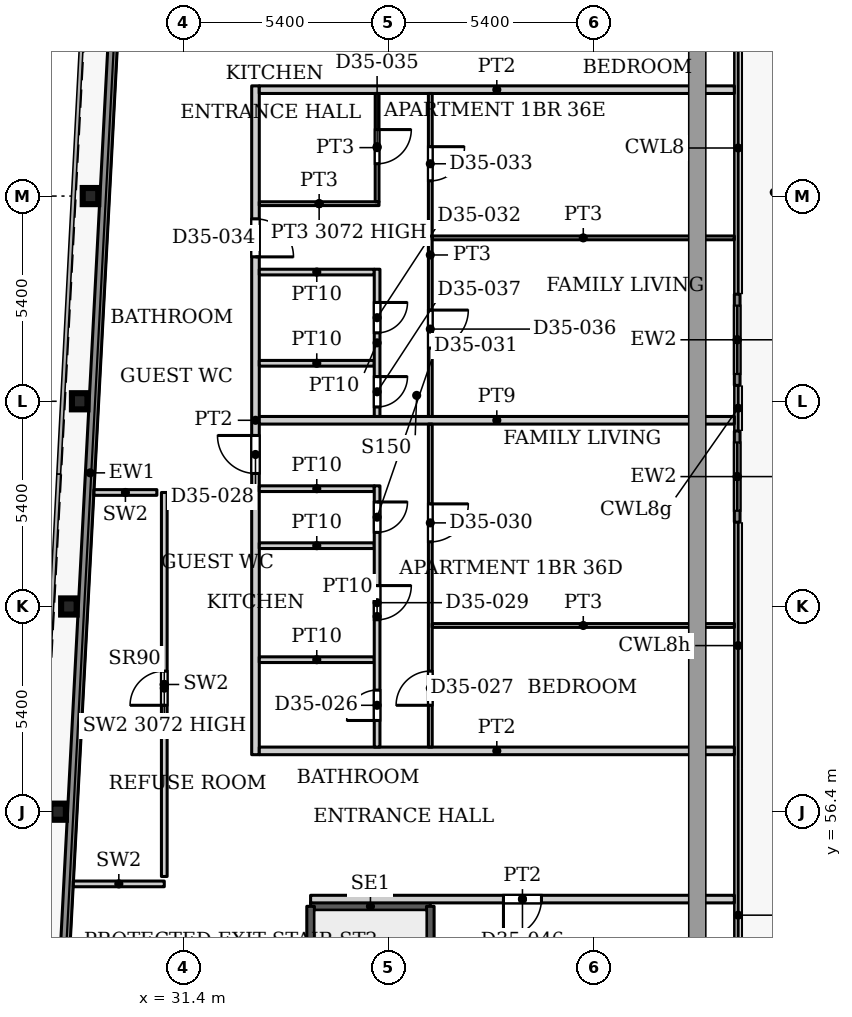
"""IFC4 building model, lengths in metres.
Left out: names, types, materials, properties, quantities, classifications, styles, units other than length and angle.
Written with IfcOpenShell. Run it as: python <this file> out.ifc"""

import sys

from ifc_helpers import new_model, si_unit, direction, frame, frame_2d, origin, origin_2d, place, context, subcontext, project, spatial, rectangle, i_section, extrude, source, transform, mapped, element, fill, save


model = new_model("IFC4")
c1 = context("Model", 3, precision=1e-05, world=origin(), true_north=direction((0.0, 1.0)))
c2 = subcontext(c1, "Body", "Model", "MODEL_VIEW")
j1 = project(units=[si_unit("LENGTHUNIT", "METRE"), si_unit("PLANEANGLEUNIT", "RADIAN")], contexts=[c1])
p1 = place(None, origin())
s1 = spatial("IfcSite", under=j1, at=p1, CompositionType="ELEMENT")
p2 = place(p1, origin())
s2 = spatial("IfcBuilding", under=s1, at=p2, CompositionType="ELEMENT")
p3 = place(p2, frame((0.0, 0.0, 156.5)))
s3 = spatial("IfcBuildingStorey", under=s2, at=p3, CompositionType="ELEMENT", Elevation=156.5)
for number, where, z_axis, x_axis in (
    (1, (28.106, 56.4, 0.0), (0.0, 0.0, 1.0), (1.0, 0.0, 0.0)),
    (2, (28.39, 61.8, 0.0), (0.0, 0.0, 1.0), (1.0, 0.0, 0.0)),
    (3, (28.674, 67.2, 0.0), (0.0, 0.0, 1.0), (1.0, 0.0, 0.0)),
    (4, (28.958, 72.6, 0.0), (0.0, 0.0, 1.0), (1.0, 0.0, 0.0)),
):
    element("IfcColumn", number, at=place(p3, frame(where, z_axis=z_axis, x_axis=x_axis)), inside=s3, PredefinedType="COLUMN", context=c2, shape_type="SweptSolid", body=[
        extrude(i_section(OverallWidth=0.409, OverallDepth=0.425, WebThickness=0.033, FlangeThickness=0.052, FilletRadius=0.013, at=origin_2d()), origin(), (0.0, 0.0, 1.0), 3.9),
    ])
p4 = place(p3, frame((27.195, 31.969, 0.0), z_axis=(0.0, 0.0, 1.0), x_axis=(0.052554995867, 0.998618031286, 0.0)))
e5 = element("IfcWall", 5, at=p4, inside=s3, PredefinedType="SOLIDWALL", context=c2, shape_type="SweptSolid", body=[
    extrude(rectangle(XDim=66.787, YDim=0.25, at=frame_2d((33.394, 0.0))), origin(), (0.0, 0.0, 1.0), 3.75),
])
p5 = place(p3, frame((45.975, 70.018, 0.0), z_axis=(0.0, 0.0, 1.0), x_axis=(0.0, -1.0, 0.0)))
e6 = element("IfcWall", 6, at=p5, inside=s3, PredefinedType="SOLIDWALL", context=c2, shape_type="SweptSolid", body=[
    extrude(rectangle(XDim=2.4, YDim=0.15, at=frame_2d((1.2, 0.0))), origin(), (0.0, 0.0, 1.0), 3.75),
])
p6 = place(p5, frame((0.3, 0.0, 0.0)))
e7 = element("IfcOpeningElement", 7, at=p6, cuts=e6, PredefinedType="OPENING", context=c2, shape_type="SweptSolid", body=[
    extrude(rectangle(XDim=1.8, YDim=2.4, at=frame_2d((0.9, 1.2))), frame((0.0, 0.085, 0.0), z_axis=(0.0, -1.0, 0.0), x_axis=(1.0, 0.0, 0.0)), (0.0, 0.0, 1.0), 0.17),
])
p7 = place(p3, frame((45.975, 66.418, 0.0), z_axis=(0.0, 0.0, 1.0), x_axis=(0.0, -1.0, 0.0)))
e8 = element("IfcWall", 8, at=p7, inside=s3, PredefinedType="SOLIDWALL", context=c2, shape_type="SweptSolid", body=[
    extrude(rectangle(XDim=2.4, YDim=0.15, at=frame_2d((1.2, 0.0))), origin(), (0.0, 0.0, 1.0), 3.75),
])
p8 = place(p7, frame((0.3, 0.0, 0.0)))
e9 = element("IfcOpeningElement", 9, at=p8, cuts=e8, PredefinedType="OPENING", context=c2, shape_type="SweptSolid", body=[
    extrude(rectangle(XDim=1.8, YDim=2.4, at=frame_2d((0.9, 1.2))), frame((0.0, 0.085, 0.0), z_axis=(0.0, -1.0, 0.0), x_axis=(1.0, 0.0, 0.0)), (0.0, 0.0, 1.0), 0.17),
])
p9 = place(p3, frame((34.75, 53.91, 0.0), z_axis=(0.0, 0.0, 1.0), x_axis=(1.0, 0.0, 0.0)))
e10 = element("IfcWall", 10, at=p9, inside=s3, PredefinedType="SHEAR", context=c2, shape_type="SweptSolid", body=[
    extrude(rectangle(XDim=3.15, YDim=0.2, at=frame_2d((1.575, 0.0))), origin(), (0.0, 0.0, 1.0), 3.9),
])
p10 = place(p3, frame((34.75, 47.5, 0.0), z_axis=(0.0, 0.0, 1.0), x_axis=(0.0, 1.0, 0.0)))
e11 = element("IfcWall", 11, at=p10, inside=s3, PredefinedType="SHEAR", context=c2, shape_type="SweptSolid", body=[
    extrude(rectangle(XDim=6.41, YDim=0.2, at=frame_2d((3.205, 0.0))), origin(), (0.0, 0.0, 1.0), 3.9),
])
p11 = place(p3, frame((37.9, 44.75, 0.0), z_axis=(0.0, 0.0, 1.0), x_axis=(0.0, 1.0, 0.0)))
e12 = element("IfcWall", 12, at=p11, inside=s3, PredefinedType="SHEAR", context=c2, shape_type="SweptSolid", body=[
    extrude(rectangle(XDim=9.16, YDim=0.2, at=frame_2d((4.58, 0.0))), origin(), (0.0, 0.0, 1.0), 3.9),
])
p12 = place(p3, frame((28.508, 54.5, 0.0), z_axis=(0.0, 0.0, 1.0), x_axis=(1.0, 0.0, 0.0)))
e13 = element("IfcWall", 13, at=p12, inside=s3, PredefinedType="PARTITIONING", context=c2, shape_type="SweptSolid", body=[
    extrude(rectangle(XDim=2.392, YDim=0.15, at=frame_2d((1.196, 0.0))), origin(), (0.0, 0.0, 1.0), 3.9),
])
p13 = place(p3, frame((30.9, 54.695, 0.0), z_axis=(0.0, 0.0, 1.0), x_axis=(0.0, 1.0, 0.0)))
e14 = element("IfcWall", 14, at=p13, inside=s3, PredefinedType="PARTITIONING", context=c2, shape_type="SweptSolid", body=[
    extrude(rectangle(XDim=10.105, YDim=0.15, at=frame_2d((5.052, 0.0))), origin(), (0.0, 0.0, 1.0), 3.072),
])
p14 = place(p13, frame((4.505, 0.0, 0.0)))
e15 = element("IfcOpeningElement", 15, at=p14, cuts=e14, PredefinedType="OPENING", context=c2, shape_type="SweptSolid", body=[
    extrude(rectangle(XDim=0.9, YDim=2.2, at=frame_2d((0.45, 1.1))), frame((0.0, 0.085, 0.0), z_axis=(0.0, -1.0, 0.0), x_axis=(1.0, 0.0, 0.0)), (0.0, 0.0, 1.0), 0.17),
])
p15 = place(p3, frame((29.05, 64.8, 0.0), z_axis=(0.0, 0.0, 1.0), x_axis=(1.0, 0.0, 0.0)))
e16 = element("IfcWall", 16, at=p15, inside=s3, PredefinedType="PARTITIONING", context=c2, shape_type="SweptSolid", body=[
    extrude(rectangle(XDim=1.655, YDim=0.15, at=frame_2d((0.828, 0.0))), origin(), (0.0, 0.0, 1.0), 3.9),
])
p16 = place(p3, frame((33.3, 57.9, 0.0), z_axis=(0.0, 0.0, 1.0), x_axis=(0.0, 1.0, 0.0)))
e17 = element("IfcWall", 17, at=p16, inside=s3, PredefinedType="PARTITIONING", context=c2, shape_type="SweptSolid", body=[
    extrude(rectangle(XDim=17.6, YDim=0.2, at=frame_2d((8.8, 0.0))), origin(), (0.0, 0.0, 1.0), 3.6),
])
p17 = place(p16, frame((7.4, 0.0, 0.0)))
e18 = element("IfcOpeningElement", 18, at=p17, cuts=e17, PredefinedType="OPENING", context=c2, shape_type="SweptSolid", body=[
    extrude(rectangle(XDim=1.0, YDim=2.1, at=frame_2d((0.5, 1.05))), frame((0.0, 0.11, 0.0), z_axis=(0.0, -1.0, 0.0), x_axis=(1.0, 0.0, 0.0)), (0.0, 0.0, 1.0), 0.22),
])
p18 = place(p16, frame((13.1, 0.0, 0.0)))
e19 = element("IfcOpeningElement", 19, at=p18, cuts=e17, PredefinedType="OPENING", context=c2, shape_type="SweptSolid", body=[
    extrude(rectangle(XDim=1.0, YDim=2.1, at=frame_2d((0.5, 1.05))), frame((0.0, 0.11, 0.0), z_axis=(0.0, -1.0, 0.0), x_axis=(1.0, 0.0, 0.0)), (0.0, 0.0, 1.0), 0.22),
])
p19 = place(p3, frame((33.4, 58.0, 0.0), z_axis=(0.0, 0.0, 1.0), x_axis=(1.0, 0.0, 0.0)))
e20 = element("IfcWall", 20, at=p19, inside=s3, PredefinedType="PARTITIONING", context=c2, shape_type="SweptSolid", body=[
    extrude(rectangle(XDim=12.5, YDim=0.2, at=frame_2d((6.25, 0.0))), origin(), (0.0, 0.0, 1.0), 3.6),
])
for number, where, z_axis, x_axis in (
    (21, (33.4, 60.4, 0.0), (0.0, 0.0, 1.0), (1.0, 0.0, 0.0)),
    (22, (33.4, 63.4, 0.0), (0.0, 0.0, 1.0), (1.0, 0.0, 0.0)),
    (23, (33.4, 64.9, 0.0), (0.0, 0.0, 1.0), (1.0, 0.0, 0.0)),
):
    element("IfcWall", number, at=place(p3, frame(where, z_axis=z_axis, x_axis=x_axis)), inside=s3, PredefinedType="PARTITIONING", context=c2, shape_type="SweptSolid", body=[
        extrude(rectangle(XDim=3.025, YDim=0.15, at=frame_2d((1.513, 0.0))), origin(), (0.0, 0.0, 1.0), 3.6),
    ])
p20 = place(p3, frame((33.4, 66.7, 0.0), z_axis=(0.0, 0.0, 1.0), x_axis=(1.0, 0.0, 0.0)))
e24 = element("IfcWall", 24, at=p20, inside=s3, PredefinedType="PARTITIONING", context=c2, shape_type="SweptSolid", body=[
    extrude(rectangle(XDim=12.5, YDim=0.2, at=frame_2d((6.25, 0.0))), origin(), (0.0, 0.0, 1.0), 3.6),
])
for number, where, z_axis, x_axis in (
    (25, (33.4, 68.2, 0.0), (0.0, 0.0, 1.0), (1.0, 0.0, 0.0)),
    (26, (33.4, 70.6, 0.0), (0.0, 0.0, 1.0), (1.0, 0.0, 0.0)),
):
    element("IfcWall", number, at=place(p3, frame(where, z_axis=z_axis, x_axis=x_axis)), inside=s3, PredefinedType="PARTITIONING", context=c2, shape_type="SweptSolid", body=[
        extrude(rectangle(XDim=3.025, YDim=0.15, at=frame_2d((1.513, 0.0))), origin(), (0.0, 0.0, 1.0), 3.6),
    ])
p21 = place(p3, frame((33.4, 72.4, 0.0), z_axis=(0.0, 0.0, 1.0), x_axis=(1.0, 0.0, 0.0)))
e27 = element("IfcWall", 27, at=p21, inside=s3, PredefinedType="PARTITIONING", context=c2, shape_type="SweptSolid", body=[
    extrude(rectangle(XDim=3.15, YDim=0.1, at=frame_2d((1.575, 0.0))), origin(), (0.0, 0.0, 1.0), 3.072),
])
p22 = place(p3, frame((33.4, 75.4, 0.0), z_axis=(0.0, 0.0, 1.0), x_axis=(1.0, 0.0, 0.0)))
e28 = element("IfcWall", 28, at=p22, inside=s3, PredefinedType="PARTITIONING", context=c2, shape_type="SweptSolid", body=[
    extrude(rectangle(XDim=12.5, YDim=0.2, at=frame_2d((6.25, 0.0))), origin(), (0.0, 0.0, 1.0), 3.6),
])
p23 = place(p3, frame((34.75, 54.1, 0.0), z_axis=(0.0, 0.0, 1.0), x_axis=(1.0, 0.0, 0.0)))
e29 = element("IfcWall", 29, at=p23, inside=s3, PredefinedType="PARTITIONING", context=c2, shape_type="SweptSolid", body=[
    extrude(rectangle(XDim=11.15, YDim=0.2, at=frame_2d((5.575, 0.0))), origin(), (0.0, 0.0, 1.0), 3.6),
])
p24 = place(p23, frame((5.075, 0.0, 0.0)))
e30 = element("IfcOpeningElement", 30, at=p24, cuts=e29, PredefinedType="OPENING", context=c2, shape_type="SweptSolid", body=[
    extrude(rectangle(XDim=1.0, YDim=2.1, at=frame_2d((0.5, 1.05))), frame((0.0, 0.11, 0.0), z_axis=(0.0, -1.0, 0.0), x_axis=(1.0, 0.0, 0.0)), (0.0, 0.0, 1.0), 0.22),
])
p25 = place(p3, frame((36.5, 58.1, 0.0), z_axis=(0.0, 0.0, 1.0), x_axis=(0.0, 1.0, 0.0)))
e31 = element("IfcWall", 31, at=p25, inside=s3, PredefinedType="PARTITIONING", context=c2, shape_type="SweptSolid", body=[
    extrude(rectangle(XDim=6.875, YDim=0.15, at=frame_2d((3.438, 0.0))), origin(), (0.0, 0.0, 1.0), 3.6),
])
p26 = place(p25, frame((0.7, 0.0, 0.0)))
e32 = element("IfcOpeningElement", 32, at=p26, cuts=e31, PredefinedType="OPENING", context=c2, shape_type="SweptSolid", body=[
    extrude(rectangle(XDim=0.8, YDim=2.1, at=frame_2d((0.4, 1.05))), frame((0.0, 0.085, 0.0), z_axis=(0.0, -1.0, 0.0), x_axis=(1.0, 0.0, 0.0)), (0.0, 0.0, 1.0), 0.17),
])
p27 = place(p25, frame((3.35, 0.0, 0.0)))
e33 = element("IfcOpeningElement", 33, at=p27, cuts=e31, PredefinedType="OPENING", context=c2, shape_type="SweptSolid", body=[
    extrude(rectangle(XDim=0.9, YDim=2.1, at=frame_2d((0.45, 1.05))), frame((0.0, 0.085, 0.0), z_axis=(0.0, -1.0, 0.0), x_axis=(1.0, 0.0, 0.0)), (0.0, 0.0, 1.0), 0.17),
])
p28 = place(p25, frame((5.65, 0.0, 0.0)))
e34 = element("IfcOpeningElement", 34, at=p28, cuts=e31, PredefinedType="OPENING", context=c2, shape_type="SweptSolid", body=[
    extrude(rectangle(XDim=0.8, YDim=2.1, at=frame_2d((0.4, 1.05))), frame((0.0, 0.085, 0.0), z_axis=(0.0, -1.0, 0.0), x_axis=(1.0, 0.0, 0.0)), (0.0, 0.0, 1.0), 0.17),
])
p29 = place(p3, frame((36.5, 66.8, 0.0), z_axis=(0.0, 0.0, 1.0), x_axis=(0.0, 1.0, 0.0)))
e35 = element("IfcWall", 35, at=p29, inside=s3, PredefinedType="PARTITIONING", context=c2, shape_type="SweptSolid", body=[
    extrude(rectangle(XDim=3.875, YDim=0.15, at=frame_2d((1.938, 0.0))), origin(), (0.0, 0.0, 1.0), 3.6),
])
p30 = place(p29, frame((2.2, 0.0, 0.0)))
e36 = element("IfcOpeningElement", 36, at=p30, cuts=e35, PredefinedType="OPENING", context=c2, shape_type="SweptSolid", body=[
    extrude(rectangle(XDim=0.8, YDim=2.1, at=frame_2d((0.4, 1.05))), frame((0.0, 0.085, 0.0), z_axis=(0.0, -1.0, 0.0), x_axis=(1.0, 0.0, 0.0)), (0.0, 0.0, 1.0), 0.17),
])
p31 = place(p29, frame((0.25, 0.0, 0.0)))
e37 = element("IfcOpeningElement", 37, at=p31, cuts=e35, PredefinedType="OPENING", context=c2, shape_type="SweptSolid", body=[
    extrude(rectangle(XDim=0.8, YDim=2.1, at=frame_2d((0.4, 1.05))), frame((0.0, 0.085, 0.0), z_axis=(0.0, -1.0, 0.0), x_axis=(1.0, 0.0, 0.0)), (0.0, 0.0, 1.0), 0.17),
])
p32 = place(p3, frame((36.5, 72.45, 0.0), z_axis=(0.0, 0.0, 1.0), x_axis=(0.0, 1.0, 0.0)))
e38 = element("IfcWall", 38, at=p32, inside=s3, PredefinedType="PARTITIONING", context=c2, shape_type="SweptSolid", body=[
    extrude(rectangle(XDim=2.85, YDim=0.1, at=frame_2d((1.425, 0.0))), origin(), (0.0, 0.0, 1.0), 3.6),
])
p33 = place(p32, frame((1.0, 0.0, 0.0)))
e39 = element("IfcOpeningElement", 39, at=p33, cuts=e38, PredefinedType="OPENING", context=c2, shape_type="SweptSolid", body=[
    extrude(rectangle(XDim=0.9, YDim=2.1, at=frame_2d((0.45, 1.05))), frame((0.0, 0.06, 0.0), z_axis=(0.0, -1.0, 0.0), x_axis=(1.0, 0.0, 0.0)), (0.0, 0.0, 1.0), 0.12),
])
p34 = place(p3, frame((37.9, 58.1, 0.0), z_axis=(0.0, 0.0, 1.0), x_axis=(0.0, 1.0, 0.0)))
e40 = element("IfcWall", 40, at=p34, inside=s3, PredefinedType="PARTITIONING", context=c2, shape_type="SweptSolid", body=[
    extrude(rectangle(XDim=8.5, YDim=0.1, at=frame_2d((4.25, 0.0))), origin(), (0.0, 0.0, 1.0), 3.6),
])
p35 = place(p34, frame((1.1, 0.0, 0.0)))
e41 = element("IfcOpeningElement", 41, at=p35, cuts=e40, PredefinedType="OPENING", context=c2, shape_type="SweptSolid", body=[
    extrude(rectangle(XDim=0.9, YDim=2.1, at=frame_2d((0.45, 1.05))), frame((0.0, 0.06, 0.0), z_axis=(0.0, -1.0, 0.0), x_axis=(1.0, 0.0, 0.0)), (0.0, 0.0, 1.0), 0.12),
])
p36 = place(p34, frame((5.4, 0.0, 0.0)))
e42 = element("IfcOpeningElement", 42, at=p36, cuts=e40, PredefinedType="OPENING", context=c2, shape_type="SweptSolid", body=[
    extrude(rectangle(XDim=1.0, YDim=2.1, at=frame_2d((0.5, 1.05))), frame((0.0, 0.06, 0.0), z_axis=(0.0, -1.0, 0.0), x_axis=(1.0, 0.0, 0.0)), (0.0, 0.0, 1.0), 0.12),
])
p37 = place(p3, frame((37.9, 66.8, 0.0), z_axis=(0.0, 0.0, 1.0), x_axis=(0.0, 1.0, 0.0)))
e43 = element("IfcWall", 43, at=p37, inside=s3, PredefinedType="PARTITIONING", context=c2, shape_type="SweptSolid", body=[
    extrude(rectangle(XDim=8.5, YDim=0.1, at=frame_2d((4.25, 0.0))), origin(), (0.0, 0.0, 1.0), 3.6),
])
p38 = place(p37, frame((6.2, 0.0, 0.0)))
e44 = element("IfcOpeningElement", 44, at=p38, cuts=e43, PredefinedType="OPENING", context=c2, shape_type="SweptSolid", body=[
    extrude(rectangle(XDim=0.9, YDim=2.1, at=frame_2d((0.45, 1.05))), frame((0.0, 0.06, 0.0), z_axis=(0.0, -1.0, 0.0), x_axis=(1.0, 0.0, 0.0)), (0.0, 0.0, 1.0), 0.12),
])
p39 = place(p37, frame((1.8, 0.0, 0.0)))
e45 = element("IfcOpeningElement", 45, at=p39, cuts=e43, PredefinedType="OPENING", context=c2, shape_type="SweptSolid", body=[
    extrude(rectangle(XDim=1.0, YDim=2.1, at=frame_2d((0.5, 1.05))), frame((0.0, 0.06, 0.0), z_axis=(0.0, -1.0, 0.0), x_axis=(1.0, 0.0, 0.0)), (0.0, 0.0, 1.0), 0.12),
])
for number, where, z_axis, x_axis in (
    (46, (37.95, 61.3, 0.0), (0.0, 0.0, 1.0), (1.0, 0.0, 0.0)),
    (47, (37.95, 71.5, 0.0), (0.0, 0.0, 1.0), (1.0, 0.0, 0.0)),
):
    element("IfcWall", number, at=place(p3, frame(where, z_axis=z_axis, x_axis=x_axis)), inside=s3, PredefinedType="PARTITIONING", context=c2, shape_type="SweptSolid", body=[
        extrude(rectangle(XDim=7.95, YDim=0.1, at=frame_2d((3.975, 0.0))), origin(), (0.0, 0.0, 1.0), 3.6),
    ])
m1 = source(origin(), c2, "Body", "SweptSolid", [
    extrude(rectangle(XDim=1.8, YDim=2.4, at=frame_2d((0.9, 1.2))), frame((0.0, 0.025, 0.0), z_axis=(0.0, -1.0, 0.0), x_axis=(1.0, 0.0, 0.0)), (0.0, 0.0, 1.0), 0.05),
])
p40 = place(p6, origin())
e48 = element("IfcDoor", 48, at=p40, inside=s3, OperationType="SLIDING_TO_LEFT", PredefinedType="DOOR", context=c2, shape_type="MappedRepresentation", body=[
    mapped(m1, transform((0.0, 0.0, 0.0), x_axis=(1.0, 0.0, 0.0), y_axis=(0.0, 1.0, 0.0), z_axis=(0.0, 0.0, 1.0), scale=1.0)),
])
fill(e7, e48)
p41 = place(p8, origin())
e49 = element("IfcDoor", 49, at=p41, inside=s3, OperationType="SLIDING_TO_LEFT", PredefinedType="DOOR", context=c2, shape_type="MappedRepresentation", body=[
    mapped(m1, transform((0.0, 0.0, 0.0), x_axis=(1.0, 0.0, 0.0), y_axis=(0.0, 1.0, 0.0), z_axis=(0.0, 0.0, 1.0), scale=1.0)),
])
fill(e9, e49)
m2 = source(origin(), c2, "Body", "SweptSolid", [
    extrude(rectangle(XDim=0.9, YDim=2.2, at=frame_2d((0.45, 1.1))), frame((0.0, 0.025, 0.0), z_axis=(0.0, -1.0, 0.0), x_axis=(1.0, 0.0, 0.0)), (0.0, 0.0, 1.0), 0.05),
])
p42 = place(p14, origin())
e50 = element("IfcDoor", 50, at=p42, inside=s3, OperationType="SINGLE_SWING_LEFT", PredefinedType="DOOR", context=c2, shape_type="MappedRepresentation", body=[
    mapped(m2, transform((0.0, 0.0, 0.0), x_axis=(1.0, 0.0, 0.0), y_axis=(0.0, 1.0, 0.0), z_axis=(0.0, 0.0, 1.0), scale=1.0)),
])
fill(e15, e50)
m3 = source(origin(), c2, "Body", "SweptSolid", [
    extrude(rectangle(XDim=0.8, YDim=2.1, at=frame_2d((0.4, 1.05))), frame((0.0, 0.025, 0.0), z_axis=(0.0, -1.0, 0.0), x_axis=(1.0, 0.0, 0.0)), (0.0, 0.0, 1.0), 0.05),
])
p43 = place(p26, origin())
e51 = element("IfcDoor", 51, at=p43, inside=s3, OperationType="SINGLE_SWING_LEFT", PredefinedType="DOOR", context=c2, shape_type="MappedRepresentation", body=[
    mapped(m3, transform((0.0, 0.0, 0.0), x_axis=(1.0, 0.0, 0.0), y_axis=(0.0, 1.0, 0.0), z_axis=(0.0, 0.0, 1.0), scale=1.0)),
])
fill(e32, e51)
m4 = source(origin(), c2, "Body", "SweptSolid", [
    extrude(rectangle(XDim=0.9, YDim=2.1, at=frame_2d((0.45, 1.05))), frame((0.0, 0.025, 0.0), z_axis=(0.0, -1.0, 0.0), x_axis=(1.0, 0.0, 0.0)), (0.0, 0.0, 1.0), 0.05),
])
p44 = place(p35, origin())
e52 = element("IfcDoor", 52, at=p44, inside=s3, OperationType="SINGLE_SWING_LEFT", PredefinedType="DOOR", context=c2, shape_type="MappedRepresentation", body=[
    mapped(m4, transform((0.0, 0.0, 0.0), x_axis=(1.0, 0.0, 0.0), y_axis=(0.0, 1.0, 0.0), z_axis=(0.0, 0.0, 1.0), scale=1.0)),
])
fill(e41, e52)
m5 = source(origin(), c2, "Body", "SweptSolid", [
    extrude(rectangle(XDim=1.0, YDim=2.1, at=frame_2d((0.5, 1.05))), frame((0.0, 0.025, 0.0), z_axis=(0.0, -1.0, 0.0), x_axis=(1.0, 0.0, 0.0)), (0.0, 0.0, 1.0), 0.05),
])
p45 = place(p17, origin())
e53 = element("IfcDoor", 53, at=p45, inside=s3, OperationType="SINGLE_SWING_LEFT", PredefinedType="DOOR", context=c2, shape_type="MappedRepresentation", body=[
    mapped(m5, transform((0.0, 0.0, 0.0), x_axis=(1.0, 0.0, 0.0), y_axis=(0.0, 1.0, 0.0), z_axis=(0.0, 0.0, 1.0), scale=1.0)),
])
fill(e18, e53)
p46 = place(p27, origin())
e54 = element("IfcDoor", 54, at=p46, inside=s3, OperationType="SINGLE_SWING_RIGHT", PredefinedType="DOOR", context=c2, shape_type="MappedRepresentation", body=[
    mapped(m4, transform((0.0, 0.0, 0.0), x_axis=(1.0, 0.0, 0.0), y_axis=(0.0, 1.0, 0.0), z_axis=(0.0, 0.0, 1.0), scale=1.0)),
])
fill(e33, e54)
m6 = source(origin(), c2, "Body", "SweptSolid", [
    extrude(rectangle(XDim=1.0, YDim=2.1, at=frame_2d((0.5, 1.05))), frame((0.0, 0.025, 0.0), z_axis=(0.0, -1.0, 0.0), x_axis=(1.0, 0.0, 0.0)), (0.0, 0.0, 1.0), 0.05),
])
p47 = place(p36, origin())
e55 = element("IfcDoor", 55, at=p47, inside=s3, OperationType="SINGLE_SWING_RIGHT", PredefinedType="DOOR", context=c2, shape_type="MappedRepresentation", body=[
    mapped(m6, transform((0.0, 0.0, 0.0), x_axis=(1.0, 0.0, 0.0), y_axis=(0.0, 1.0, 0.0), z_axis=(0.0, 0.0, 1.0), scale=1.0)),
])
fill(e42, e55)
p48 = place(p28, origin())
e56 = element("IfcDoor", 56, at=p48, inside=s3, OperationType="SINGLE_SWING_RIGHT", PredefinedType="DOOR", context=c2, shape_type="MappedRepresentation", body=[
    mapped(m3, transform((0.0, 0.0, 0.0), x_axis=(1.0, 0.0, 0.0), y_axis=(0.0, 1.0, 0.0), z_axis=(0.0, 0.0, 1.0), scale=1.0)),
])
fill(e34, e56)
p49 = place(p30, origin())
e57 = element("IfcDoor", 57, at=p49, inside=s3, OperationType="SINGLE_SWING_RIGHT", PredefinedType="DOOR", context=c2, shape_type="MappedRepresentation", body=[
    mapped(m3, transform((0.0, 0.0, 0.0), x_axis=(1.0, 0.0, 0.0), y_axis=(0.0, 1.0, 0.0), z_axis=(0.0, 0.0, 1.0), scale=1.0)),
])
fill(e36, e57)
p50 = place(p38, origin())
e58 = element("IfcDoor", 58, at=p50, inside=s3, OperationType="SINGLE_SWING_RIGHT", PredefinedType="DOOR", context=c2, shape_type="MappedRepresentation", body=[
    mapped(m4, transform((0.0, 0.0, 0.0), x_axis=(1.0, 0.0, 0.0), y_axis=(0.0, 1.0, 0.0), z_axis=(0.0, 0.0, 1.0), scale=1.0)),
])
fill(e44, e58)
p51 = place(p18, origin())
e59 = element("IfcDoor", 59, at=p51, inside=s3, OperationType="SINGLE_SWING_RIGHT", PredefinedType="DOOR", context=c2, shape_type="MappedRepresentation", body=[
    mapped(m5, transform((0.0, 0.0, 0.0), x_axis=(1.0, 0.0, 0.0), y_axis=(0.0, 1.0, 0.0), z_axis=(0.0, 0.0, 1.0), scale=1.0)),
])
fill(e19, e59)
p52 = place(p33, origin())
e60 = element("IfcDoor", 60, at=p52, inside=s3, OperationType="SINGLE_SWING_RIGHT", PredefinedType="DOOR", context=c2, shape_type="MappedRepresentation", body=[
    mapped(m4, transform((0.0, 0.0, 0.0), x_axis=(1.0, 0.0, 0.0), y_axis=(0.0, 1.0, 0.0), z_axis=(0.0, 0.0, 1.0), scale=1.0)),
])
fill(e39, e60)
p53 = place(p39, origin())
e61 = element("IfcDoor", 61, at=p53, inside=s3, OperationType="SINGLE_SWING_RIGHT", PredefinedType="DOOR", context=c2, shape_type="MappedRepresentation", body=[
    mapped(m6, transform((0.0, 0.0, 0.0), x_axis=(1.0, 0.0, 0.0), y_axis=(0.0, 1.0, 0.0), z_axis=(0.0, 0.0, 1.0), scale=1.0)),
])
fill(e45, e61)
p54 = place(p31, origin())
e62 = element("IfcDoor", 62, at=p54, inside=s3, OperationType="SINGLE_SWING_RIGHT", PredefinedType="DOOR", context=c2, shape_type="MappedRepresentation", body=[
    mapped(m3, transform((0.0, 0.0, 0.0), x_axis=(1.0, 0.0, 0.0), y_axis=(0.0, 1.0, 0.0), z_axis=(0.0, 0.0, 1.0), scale=1.0)),
])
fill(e37, e62)
m7 = source(origin(), c2, "Body", "SweptSolid", [
    extrude(rectangle(XDim=1.0, YDim=2.1, at=frame_2d((0.5, 1.05))), frame((0.0, 0.025, 0.0), z_axis=(0.0, -1.0, 0.0), x_axis=(1.0, 0.0, 0.0)), (0.0, 0.0, 1.0), 0.05),
])
p55 = place(p24, origin())
e63 = element("IfcDoor", 63, at=p55, inside=s3, OperationType="SINGLE_SWING_RIGHT", PredefinedType="DOOR", context=c2, shape_type="MappedRepresentation", body=[
    mapped(m7, transform((0.0, 0.0, 0.0), x_axis=(1.0, 0.0, 0.0), y_axis=(0.0, 1.0, 0.0), z_axis=(0.0, 0.0, 1.0), scale=1.0)),
])
fill(e30, e63)
save(model, sys.argv[1])
